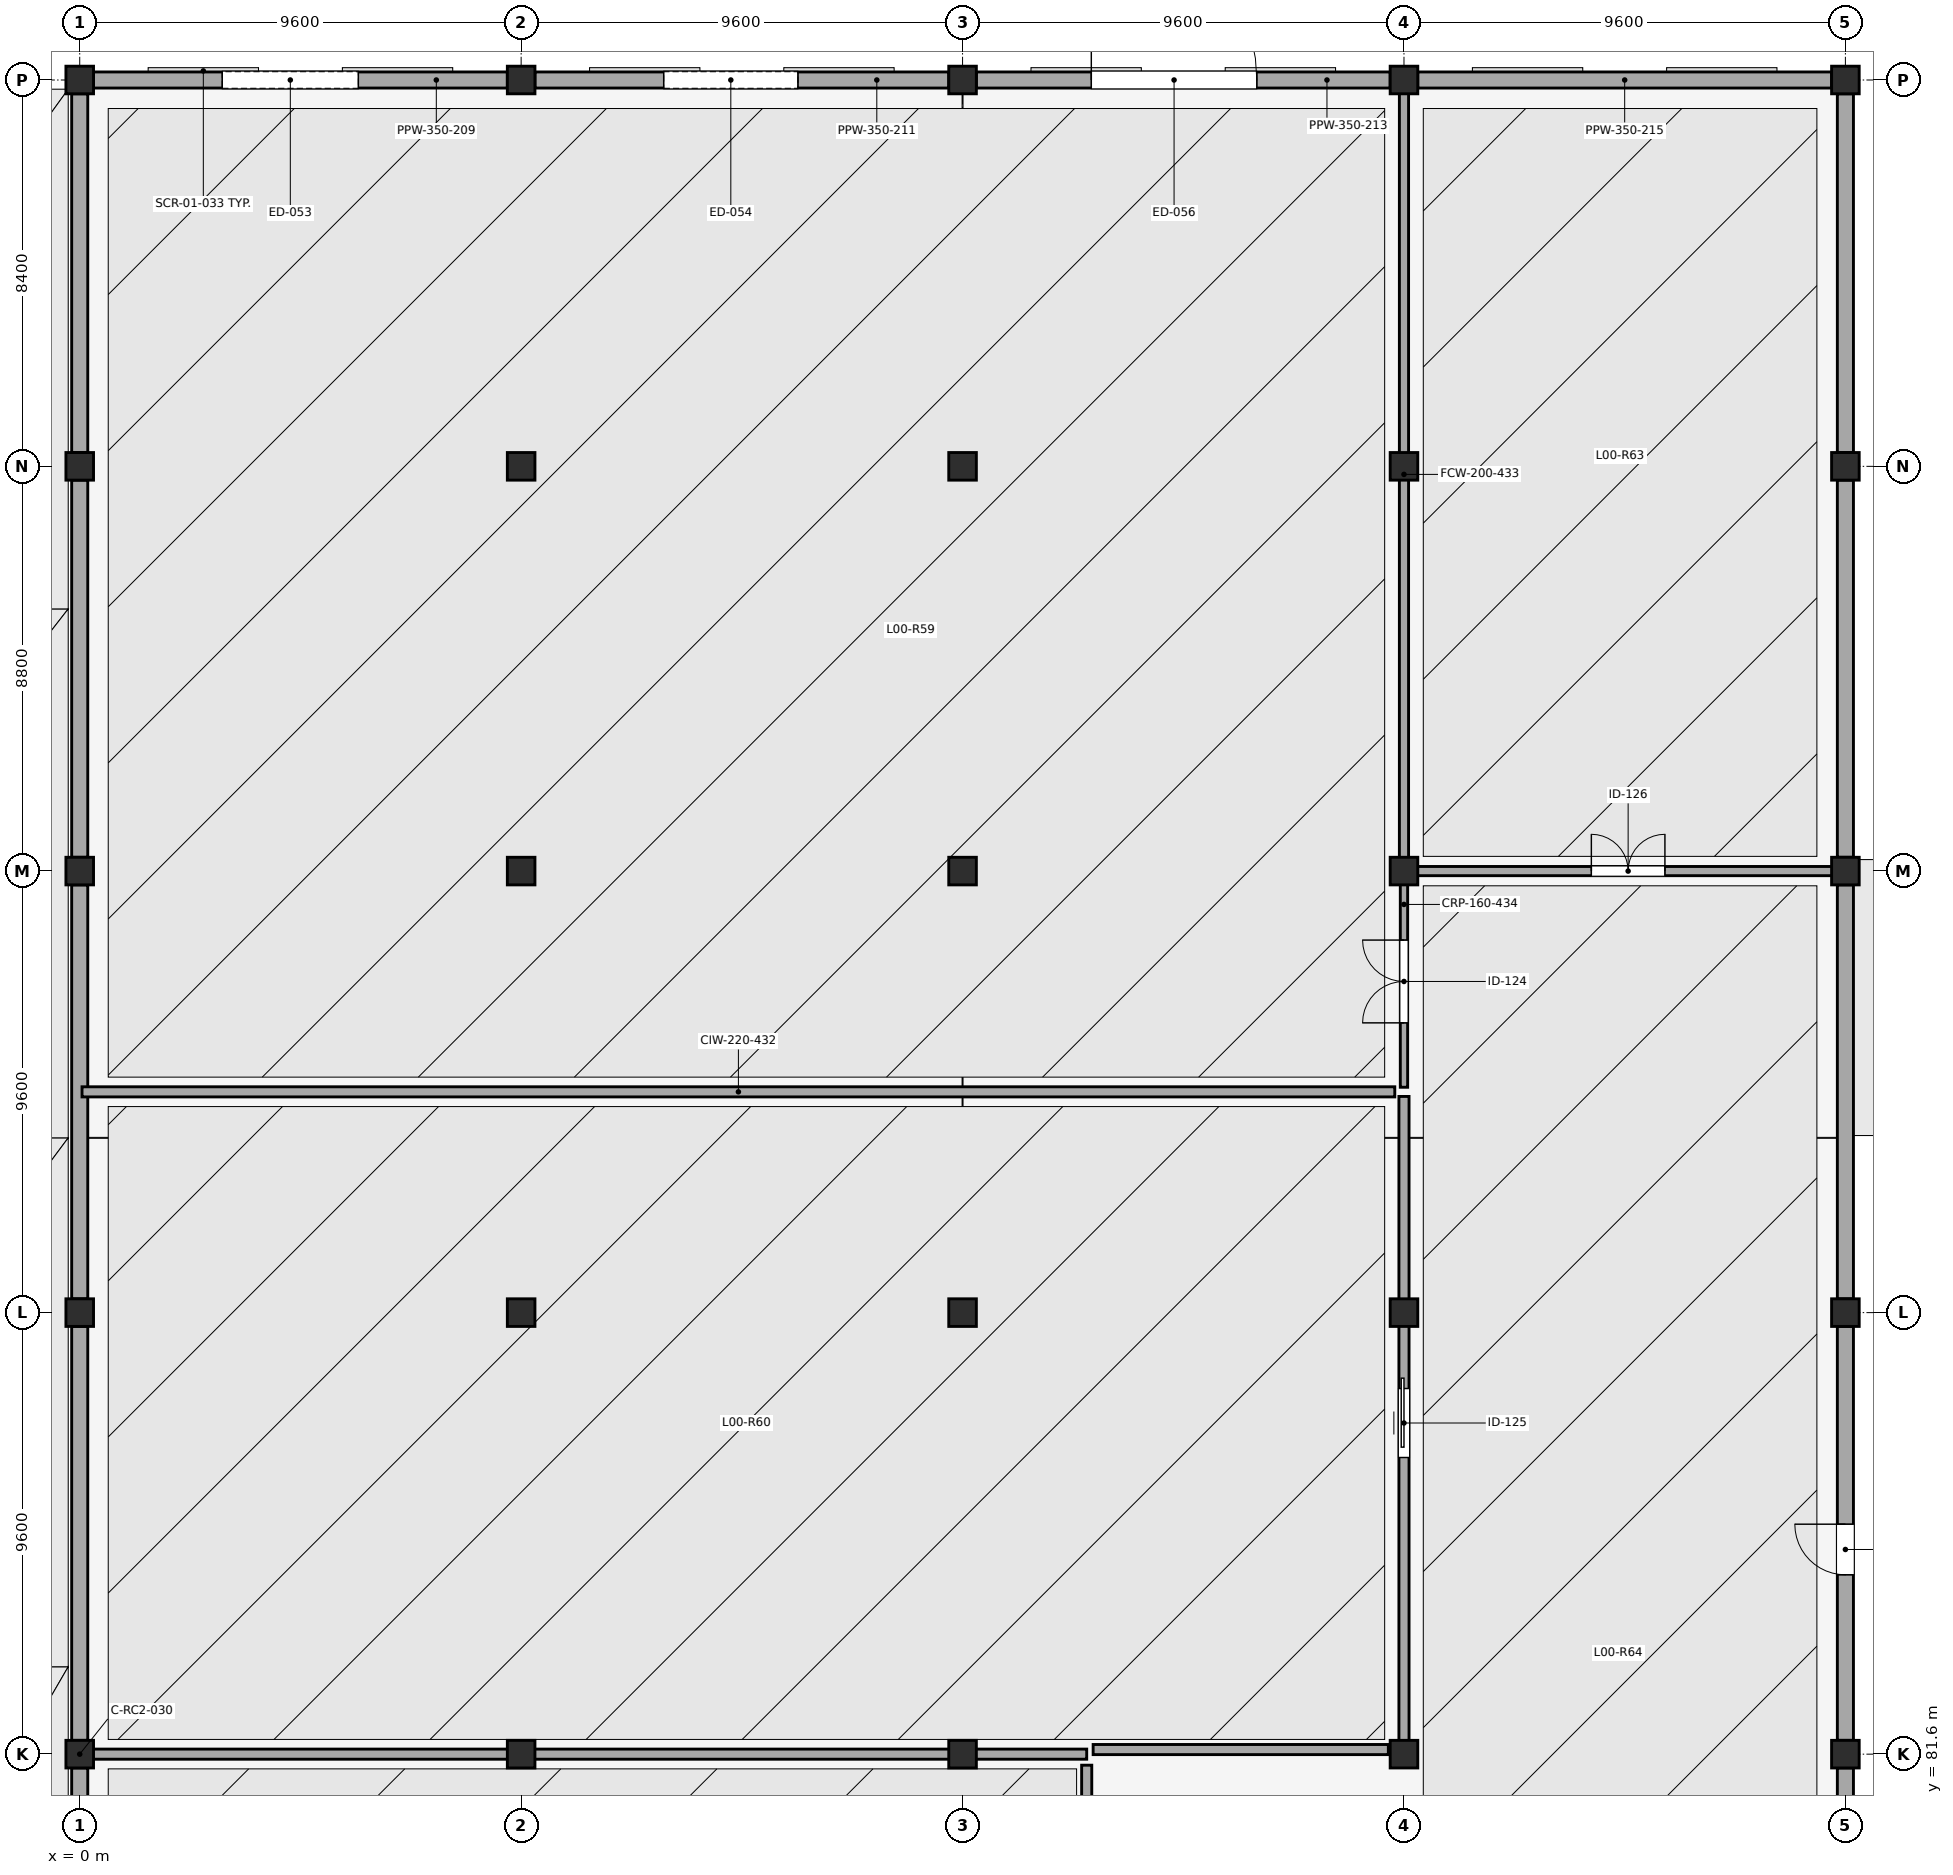
"""IFC4 building model, lengths in metres.
Left out: names, types, materials, properties, quantities, classifications, styles, units other than length and angle.
Written with IfcOpenShell. Run it as: python <this file> out.ifc"""

import sys

from ifc_helpers import new_model, si_unit, direction, frame, frame_2d, origin, origin_2d, place, context, subcontext, project, spatial, rectangle, extrude, element, fill, save


model = new_model("IFC4")
c1 = context("Model", 3, precision=1e-05, world=origin(), true_north=direction((0.0, 1.0)))
c2 = subcontext(c1, "Body", "Model", "MODEL_VIEW")
j1 = project(units=[si_unit("LENGTHUNIT", "METRE"), si_unit("PLANEANGLEUNIT", "RADIAN")], contexts=[c1])
p1 = place(None, origin())
s1 = spatial("IfcSite", under=j1, at=p1, CompositionType="ELEMENT")
p2 = place(p1, origin())
s2 = spatial("IfcBuilding", under=s1, at=p2, CompositionType="ELEMENT")
p3 = place(p2, origin())
s3 = spatial("IfcBuildingStorey", under=s2, at=p3, CompositionType="ELEMENT", Elevation=0.0)
for number, where, z_axis, x_axis in (
    (1, (0.0, 81.6, 0.0), (0.0, 0.0, 1.0), (1.0, 0.0, 0.0)),
    (2, (0.0, 91.2, 0.0), (0.0, 0.0, 1.0), (1.0, 0.0, 0.0)),
    (3, (0.0, 100.8, 0.0), (0.0, 0.0, 1.0), (1.0, 0.0, 0.0)),
    (4, (0.0, 109.6, 0.0), (0.0, 0.0, 1.0), (1.0, 0.0, 0.0)),
    (5, (0.0, 118.0, 0.0), (0.0, 0.0, 1.0), (1.0, 0.0, 0.0)),
    (6, (9.6, 81.6, 0.0), (0.0, 0.0, 1.0), (1.0, 0.0, 0.0)),
    (7, (9.6, 91.2, 0.0), (0.0, 0.0, 1.0), (1.0, 0.0, 0.0)),
    (8, (9.6, 100.8, 0.0), (0.0, 0.0, 1.0), (1.0, 0.0, 0.0)),
    (9, (9.6, 109.6, 0.0), (0.0, 0.0, 1.0), (1.0, 0.0, 0.0)),
    (10, (9.6, 118.0, 0.0), (0.0, 0.0, 1.0), (1.0, 0.0, 0.0)),
    (11, (19.2, 81.6, 0.0), (0.0, 0.0, 1.0), (1.0, 0.0, 0.0)),
    (12, (19.2, 91.2, 0.0), (0.0, 0.0, 1.0), (1.0, 0.0, 0.0)),
    (13, (19.2, 100.8, 0.0), (0.0, 0.0, 1.0), (1.0, 0.0, 0.0)),
    (14, (19.2, 109.6, 0.0), (0.0, 0.0, 1.0), (1.0, 0.0, 0.0)),
    (15, (19.2, 118.0, 0.0), (0.0, 0.0, 1.0), (1.0, 0.0, 0.0)),
    (16, (28.8, 81.6, 0.0), (0.0, 0.0, 1.0), (1.0, 0.0, 0.0)),
    (17, (28.8, 91.2, 0.0), (0.0, 0.0, 1.0), (1.0, 0.0, 0.0)),
    (18, (28.8, 100.8, 0.0), (0.0, 0.0, 1.0), (1.0, 0.0, 0.0)),
    (19, (28.8, 109.6, 0.0), (0.0, 0.0, 1.0), (1.0, 0.0, 0.0)),
    (20, (28.8, 118.0, 0.0), (0.0, 0.0, 1.0), (1.0, 0.0, 0.0)),
    (21, (38.4, 81.6, 0.0), (0.0, 0.0, 1.0), (1.0, 0.0, 0.0)),
    (22, (38.4, 91.2, 0.0), (0.0, 0.0, 1.0), (1.0, 0.0, 0.0)),
    (23, (38.4, 100.8, 0.0), (0.0, 0.0, 1.0), (1.0, 0.0, 0.0)),
    (24, (38.4, 109.6, 0.0), (0.0, 0.0, 1.0), (1.0, 0.0, 0.0)),
    (25, (38.4, 118.0, 0.0), (0.0, 0.0, 1.0), (1.0, 0.0, 0.0)),
):
    element("IfcColumn", number, at=place(p3, frame(where, z_axis=z_axis, x_axis=x_axis)), inside=s3, PredefinedType="COLUMN", context=c2, shape_type="SweptSolid", body=[
        extrude(rectangle(XDim=0.6, YDim=0.6, at=origin_2d()), origin(), (0.0, 0.0, 1.0), 4.8),
    ])
p4 = place(p3, frame((0.3, 118.0, 0.0), z_axis=(0.0, 0.0, 1.0), x_axis=(1.0, 0.0, 0.0)))
e26 = element("IfcWall", 26, at=p4, inside=s3, PredefinedType="SOLIDWALL", context=c2, shape_type="SweptSolid", body=[
    extrude(rectangle(XDim=9.0, YDim=0.35, at=frame_2d((4.5, 0.0))), origin(), (0.0, 0.0, 1.0), 4.1),
])
p5 = place(p4, frame((2.8, 0.0, 0.0)))
e27 = element("IfcOpeningElement", 27, at=p5, cuts=e26, PredefinedType="OPENING", context=c2, shape_type="SweptSolid", body=[
    extrude(rectangle(XDim=2.96, YDim=3.17, at=frame_2d((1.48, 1.585))), frame((0.0, 0.185, 0.0), z_axis=(0.0, -1.0, 0.0), x_axis=(1.0, 0.0, 0.0)), (0.0, 0.0, 1.0), 0.37),
])
p6 = place(p3, frame((9.9, 118.0, 0.0), z_axis=(0.0, 0.0, 1.0), x_axis=(1.0, 0.0, 0.0)))
e28 = element("IfcWall", 28, at=p6, inside=s3, PredefinedType="SOLIDWALL", context=c2, shape_type="SweptSolid", body=[
    extrude(rectangle(XDim=9.0, YDim=0.35, at=frame_2d((4.5, 0.0))), origin(), (0.0, 0.0, 1.0), 4.1),
])
p7 = place(p6, frame((2.8, 0.0, 0.0)))
e29 = element("IfcOpeningElement", 29, at=p7, cuts=e28, PredefinedType="OPENING", context=c2, shape_type="SweptSolid", body=[
    extrude(rectangle(XDim=2.92, YDim=3.14, at=frame_2d((1.46, 1.57))), frame((0.0, 0.185, 0.0), z_axis=(0.0, -1.0, 0.0), x_axis=(1.0, 0.0, 0.0)), (0.0, 0.0, 1.0), 0.37),
])
p8 = place(p3, frame((19.5, 118.0, 0.0), z_axis=(0.0, 0.0, 1.0), x_axis=(1.0, 0.0, 0.0)))
e30 = element("IfcWall", 30, at=p8, inside=s3, PredefinedType="SOLIDWALL", context=c2, shape_type="SweptSolid", body=[
    extrude(rectangle(XDim=9.0, YDim=0.35, at=frame_2d((4.5, 0.0))), origin(), (0.0, 0.0, 1.0), 4.1),
])
p9 = place(p8, frame((2.5, 0.0, 0.0)))
e31 = element("IfcOpeningElement", 31, at=p9, cuts=e30, PredefinedType="OPENING", context=c2, shape_type="SweptSolid", body=[
    extrude(rectangle(XDim=3.6, YDim=2.8, at=frame_2d((1.8, 1.4))), frame((0.0, 0.185, 0.0), z_axis=(0.0, -1.0, 0.0), x_axis=(1.0, 0.0, 0.0)), (0.0, 0.0, 1.0), 0.37),
])
for number, where, z_axis, x_axis in (
    (32, (29.1, 118.0, 0.0), (0.0, 0.0, 1.0), (1.0, 0.0, 0.0)),
    (33, (0.0, 72.3, 0.0), (0.0, 0.0, 1.0), (0.0, 1.0, 0.0)),
    (34, (38.4, 72.3, 0.0), (0.0, 0.0, 1.0), (0.0, 1.0, 0.0)),
    (35, (0.0, 81.9, 0.0), (0.0, 0.0, 1.0), (0.0, 1.0, 0.0)),
):
    element("IfcWall", number, at=place(p3, frame(where, z_axis=z_axis, x_axis=x_axis)), inside=s3, PredefinedType="SOLIDWALL", context=c2, shape_type="SweptSolid", body=[
        extrude(rectangle(XDim=9.0, YDim=0.35, at=frame_2d((4.5, 0.0))), origin(), (0.0, 0.0, 1.0), 4.1),
    ])
p10 = place(p3, frame((38.4, 81.9, 0.0), z_axis=(0.0, 0.0, 1.0), x_axis=(0.0, 1.0, 0.0)))
e36 = element("IfcWall", 36, at=p10, inside=s3, PredefinedType="SOLIDWALL", context=c2, shape_type="SweptSolid", body=[
    extrude(rectangle(XDim=9.0, YDim=0.35, at=frame_2d((4.5, 0.0))), origin(), (0.0, 0.0, 1.0), 4.1),
])
p11 = place(p10, frame((3.6, 0.0, 0.0)))
e37 = element("IfcOpeningElement", 37, at=p11, cuts=e36, PredefinedType="OPENING", context=c2, shape_type="SweptSolid", body=[
    extrude(rectangle(XDim=1.1, YDim=2.2, at=frame_2d((0.55, 1.1))), frame((0.0, 0.185, 0.0), z_axis=(0.0, -1.0, 0.0), x_axis=(1.0, 0.0, 0.0)), (0.0, 0.0, 1.0), 0.37),
])
for number, where, z_axis, x_axis in (
    (38, (0.0, 91.5, 0.0), (0.0, 0.0, 1.0), (0.0, 1.0, 0.0)),
    (39, (38.4, 91.5, 0.0), (0.0, 0.0, 1.0), (0.0, 1.0, 0.0)),
):
    element("IfcWall", number, at=place(p3, frame(where, z_axis=z_axis, x_axis=x_axis)), inside=s3, PredefinedType="SOLIDWALL", context=c2, shape_type="SweptSolid", body=[
        extrude(rectangle(XDim=9.0, YDim=0.35, at=frame_2d((4.5, 0.0))), origin(), (0.0, 0.0, 1.0), 4.1),
    ])
for number, where, z_axis, x_axis in (
    (40, (0.0, 101.1, 0.0), (0.0, 0.0, 1.0), (0.0, 1.0, 0.0)),
    (41, (38.4, 101.1, 0.0), (0.0, 0.0, 1.0), (0.0, 1.0, 0.0)),
):
    element("IfcWall", number, at=place(p3, frame(where, z_axis=z_axis, x_axis=x_axis)), inside=s3, PredefinedType="SOLIDWALL", context=c2, shape_type="SweptSolid", body=[
        extrude(rectangle(XDim=8.2, YDim=0.35, at=frame_2d((4.1, 0.0))), origin(), (0.0, 0.0, 1.0), 4.1),
    ])
for number, where, z_axis, x_axis in (
    (42, (0.0, 109.9, 0.0), (0.0, 0.0, 1.0), (0.0, 1.0, 0.0)),
    (43, (38.4, 109.9, 0.0), (0.0, 0.0, 1.0), (0.0, 1.0, 0.0)),
):
    element("IfcWall", number, at=place(p3, frame(where, z_axis=z_axis, x_axis=x_axis)), inside=s3, PredefinedType="SOLIDWALL", context=c2, shape_type="SweptSolid", body=[
        extrude(rectangle(XDim=7.8, YDim=0.35, at=frame_2d((3.9, 0.0))), origin(), (0.0, 0.0, 1.0), 4.1),
    ])
p12 = place(p2, frame((0.0, 0.0, -4.2)))
s4 = spatial("IfcBuildingStorey", under=s2, at=p12, CompositionType="ELEMENT", Elevation=-4.2)
for number, where, z_axis, x_axis in (
    (44, (38.575, 89.0, 0.0), (0.0, 0.0, 1.0), (1.0, 0.0, 0.0)),
    (45, (38.575, 95.0, 0.0), (0.0, 0.0, 1.0), (1.0, 0.0, 0.0)),
):
    element("IfcWall", number, at=place(p12, frame(where, z_axis=z_axis, x_axis=x_axis)), inside=s4, PredefinedType="SOLIDWALL", context=c2, shape_type="SweptSolid", body=[
        extrude(rectangle(XDim=9.25, YDim=0.4, at=frame_2d((4.625, 0.0))), origin(), (0.0, 0.0, 1.0), 9.0),
    ])
p13 = place(p3, frame((0.05, 96.0, 0.0), z_axis=(0.0, 0.0, 1.0), x_axis=(1.0, 0.0, 0.0)))
e46 = element("IfcWall", 46, at=p13, inside=s3, PredefinedType="PARTITIONING", context=c2, shape_type="SweptSolid", body=[
    extrude(rectangle(XDim=28.55, YDim=0.22, at=frame_2d((14.275, 0.0))), origin(), (0.0, 0.0, 1.0), 4.4),
])
p14 = place(p3, frame((28.8, 100.9, 0.0), z_axis=(0.0, 0.0, 1.0), x_axis=(0.0, 1.0, 0.0)))
e47 = element("IfcWall", 47, at=p14, inside=s3, PredefinedType="PARTITIONING", context=c2, shape_type="SweptSolid", body=[
    extrude(rectangle(XDim=17.05, YDim=0.2, at=frame_2d((8.525, 0.0))), origin(), (0.0, 0.0, 1.0), 3.69),
])
p15 = place(p3, frame((28.8, 96.1, 0.0), z_axis=(0.0, 0.0, 1.0), x_axis=(0.0, 1.0, 0.0)))
e48 = element("IfcWall", 48, at=p15, inside=s3, PredefinedType="PARTITIONING", context=c2, shape_type="SweptSolid", body=[
    extrude(rectangle(XDim=4.6, YDim=0.16, at=frame_2d((2.3, 0.0))), origin(), (0.0, 0.0, 1.0), 3.69),
])
p16 = place(p15, frame((1.4, 0.0, 0.0)))
e49 = element("IfcOpeningElement", 49, at=p16, cuts=e48, PredefinedType="OPENING", context=c2, shape_type="SweptSolid", body=[
    extrude(rectangle(XDim=1.8, YDim=2.15, at=frame_2d((0.9, 1.075))), frame((0.0, 0.09, 0.0), z_axis=(0.0, -1.0, 0.0), x_axis=(1.0, 0.0, 0.0)), (0.0, 0.0, 1.0), 0.18),
])
p17 = place(p3, frame((0.05, 81.6, 0.0), z_axis=(0.0, 0.0, 1.0), x_axis=(1.0, 0.0, 0.0)))
e50 = element("IfcWall", 50, at=p17, inside=s3, PredefinedType="PARTITIONING", context=c2, shape_type="SweptSolid", body=[
    extrude(rectangle(XDim=21.85, YDim=0.22, at=frame_2d((10.925, 0.0))), origin(), (0.0, 0.0, 1.0), 3.75),
])
p18 = place(p3, frame((28.8, 81.7, 0.0), z_axis=(0.0, 0.0, 1.0), x_axis=(0.0, 1.0, 0.0)))
e51 = element("IfcWall", 51, at=p18, inside=s3, PredefinedType="PARTITIONING", context=c2, shape_type="SweptSolid", body=[
    extrude(rectangle(XDim=14.2, YDim=0.22, at=frame_2d((7.1, 0.0))), origin(), (0.0, 0.0, 1.0), 3.69),
])
p19 = place(p18, frame((6.35, 0.0, 0.0)))
e52 = element("IfcOpeningElement", 52, at=p19, cuts=e51, PredefinedType="OPENING", context=c2, shape_type="SweptSolid", body=[
    extrude(rectangle(XDim=1.5, YDim=2.2, at=frame_2d((0.75, 1.1))), frame((0.0, 0.12, 0.0), z_axis=(0.0, -1.0, 0.0), x_axis=(1.0, 0.0, 0.0)), (0.0, 0.0, 1.0), 0.24),
])
p20 = place(p3, frame((29.0, 100.8, 0.0), z_axis=(0.0, 0.0, 1.0), x_axis=(1.0, 0.0, 0.0)))
e53 = element("IfcWall", 53, at=p20, inside=s3, PredefinedType="PARTITIONING", context=c2, shape_type="SweptSolid", body=[
    extrude(rectangle(XDim=9.35, YDim=0.2, at=frame_2d((4.675, 0.0))), origin(), (0.0, 0.0, 1.0), 3.75),
])
p21 = place(p20, frame((3.875, 0.0, 0.0)))
e54 = element("IfcOpeningElement", 54, at=p21, cuts=e53, PredefinedType="OPENING", context=c2, shape_type="SweptSolid", body=[
    extrude(rectangle(XDim=1.6, YDim=2.2, at=frame_2d((0.8, 1.1))), frame((0.0, 0.11, 0.0), z_axis=(0.0, -1.0, 0.0), x_axis=(1.0, 0.0, 0.0)), (0.0, 0.0, 1.0), 0.22),
])
p22 = place(p3, frame((22.04, 81.7, 0.0), z_axis=(0.0, 0.0, 1.0), x_axis=(1.0, 0.0, 0.0)))
e55 = element("IfcWall", 55, at=p22, inside=s3, PredefinedType="PARTITIONING", context=c2, shape_type="SweptSolid", body=[
    extrude(rectangle(XDim=6.42, YDim=0.22, at=frame_2d((3.21, 0.0))), origin(), (0.0, 0.0, 1.0), 3.75),
])
p23 = place(p3, frame((21.9, 78.94, 0.0), z_axis=(0.0, 0.0, 1.0), x_axis=(0.0, 1.0, 0.0)))
e56 = element("IfcWall", 56, at=p23, inside=s3, PredefinedType="PARTITIONING", context=c2, shape_type="SweptSolid", body=[
    extrude(rectangle(XDim=2.42, YDim=0.22, at=frame_2d((1.21, 0.0))), origin(), (0.0, 0.0, 1.0), 4.4),
])
p24 = place(p23, frame((0.71, 0.0, 0.0)))
e57 = element("IfcOpeningElement", 57, at=p24, cuts=e56, PredefinedType="OPENING", context=c2, shape_type="SweptSolid", body=[
    extrude(rectangle(XDim=1.0, YDim=2.15, at=frame_2d((0.5, 1.075))), frame((0.0, 0.12, 0.0), z_axis=(0.0, -1.0, 0.0), x_axis=(1.0, 0.0, 0.0)), (0.0, 0.0, 1.0), 0.24),
])
p25 = place(p5, origin())
e58 = element("IfcDoor", 58, at=p25, inside=s3, OperationType="ROLLINGUP", PredefinedType="DOOR", context=c2, shape_type="SweptSolid", body=[
    extrude(rectangle(XDim=2.96, YDim=3.17, at=frame_2d((1.48, 1.585))), frame((0.0, 0.025, 0.0), z_axis=(0.0, -1.0, 0.0), x_axis=(1.0, 0.0, 0.0)), (0.0, 0.0, 1.0), 0.05),
])
fill(e27, e58)
p26 = place(p7, origin())
e59 = element("IfcDoor", 59, at=p26, inside=s3, OperationType="ROLLINGUP", PredefinedType="DOOR", context=c2, shape_type="SweptSolid", body=[
    extrude(rectangle(XDim=2.92, YDim=3.14, at=frame_2d((1.46, 1.57))), frame((0.0, 0.025, 0.0), z_axis=(0.0, -1.0, 0.0), x_axis=(1.0, 0.0, 0.0)), (0.0, 0.0, 1.0), 0.05),
])
fill(e29, e59)
p27 = place(p9, origin())
e60 = element("IfcDoor", 60, at=p27, inside=s3, OperationType="FOLDING_TO_LEFT", PredefinedType="DOOR", context=c2, shape_type="SweptSolid", body=[
    extrude(rectangle(XDim=3.6, YDim=2.8, at=frame_2d((1.8, 1.4))), frame((0.0, 0.025, 0.0), z_axis=(0.0, -1.0, 0.0), x_axis=(1.0, 0.0, 0.0)), (0.0, 0.0, 1.0), 0.05),
])
fill(e31, e60)
p28 = place(p11, origin())
e61 = element("IfcDoor", 61, at=p28, inside=s3, OperationType="SINGLE_SWING_RIGHT", PredefinedType="DOOR", context=c2, shape_type="SweptSolid", body=[
    extrude(rectangle(XDim=1.1, YDim=2.2, at=frame_2d((0.55, 1.1))), frame((0.0, 0.025, 0.0), z_axis=(0.0, -1.0, 0.0), x_axis=(1.0, 0.0, 0.0)), (0.0, 0.0, 1.0), 0.05),
])
fill(e37, e61)
p29 = place(p16, origin())
e62 = element("IfcDoor", 62, at=p29, inside=s3, OperationType="DOUBLE_DOOR_SINGLE_SWING", PredefinedType="DOOR", context=c2, shape_type="SweptSolid", body=[
    extrude(rectangle(XDim=1.8, YDim=2.15, at=frame_2d((0.9, 1.075))), frame((0.0, 0.025, 0.0), z_axis=(0.0, -1.0, 0.0), x_axis=(1.0, 0.0, 0.0)), (0.0, 0.0, 1.0), 0.05),
])
fill(e49, e62)
p30 = place(p19, origin())
e63 = element("IfcDoor", 63, at=p30, inside=s3, OperationType="SLIDING_TO_RIGHT", PredefinedType="DOOR", context=c2, shape_type="SweptSolid", body=[
    extrude(rectangle(XDim=1.5, YDim=2.2, at=frame_2d((0.75, 1.1))), frame((0.0, 0.025, 0.0), z_axis=(0.0, -1.0, 0.0), x_axis=(1.0, 0.0, 0.0)), (0.0, 0.0, 1.0), 0.05),
])
fill(e52, e63)
p31 = place(p21, origin())
e64 = element("IfcDoor", 64, at=p31, inside=s3, OperationType="DOUBLE_DOOR_SINGLE_SWING", PredefinedType="DOOR", context=c2, shape_type="SweptSolid", body=[
    extrude(rectangle(XDim=1.6, YDim=2.2, at=frame_2d((0.8, 1.1))), frame((0.0, 0.025, 0.0), z_axis=(0.0, -1.0, 0.0), x_axis=(1.0, 0.0, 0.0)), (0.0, 0.0, 1.0), 0.05),
])
fill(e54, e64)
save(model, sys.argv[1])
